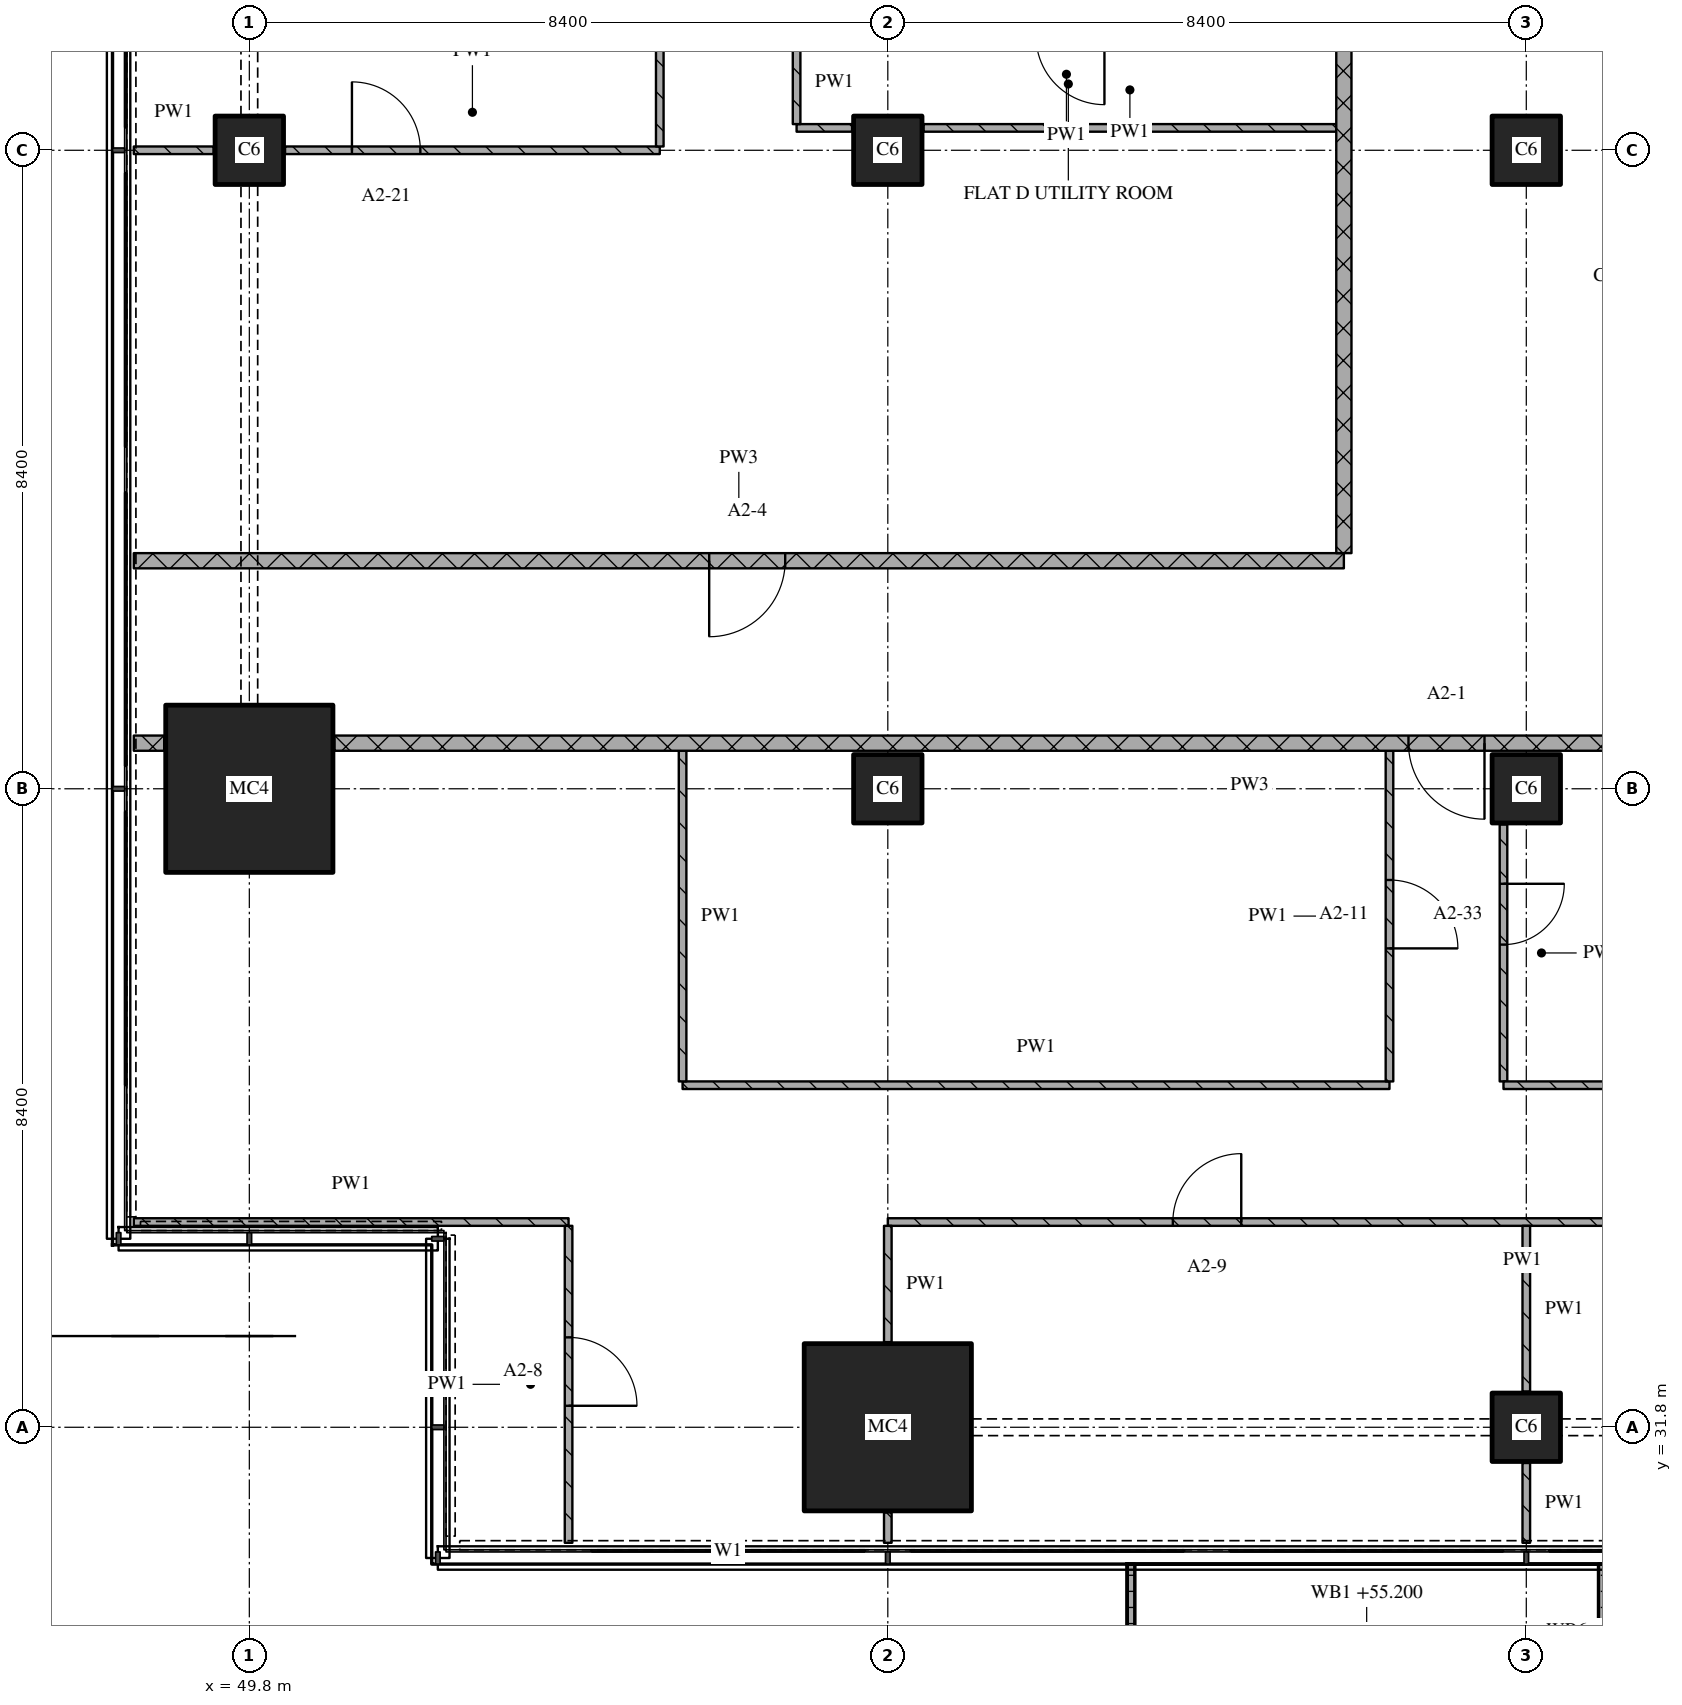
"""IFC4 building model, lengths in metres.
Left out: names, types, materials, properties, quantities, classifications, styles, units other than length and angle.
Written with IfcOpenShell. Run it as: python <this file> out.ifc"""

import sys

from ifc_helpers import new_model, si_unit, direction, frame, frame_2d, origin, origin_2d, place, context, subcontext, project, spatial, polyline, rectangle, outline, extrude, element, fill, save


model = new_model("IFC4")
c1 = context("Model", 3, precision=1e-05, world=origin(), true_north=direction((0.0, 1.0)))
c2 = subcontext(c1, "Body", "Model", "MODEL_VIEW")
j1 = project(units=[si_unit("LENGTHUNIT", "METRE"), si_unit("PLANEANGLEUNIT", "RADIAN")], contexts=[c1])
p1 = place(None, origin())
s1 = spatial("IfcSite", under=j1, at=p1, CompositionType="ELEMENT")
p2 = place(p1, origin())
s2 = spatial("IfcBuilding", under=s1, at=p2, CompositionType="ELEMENT")
p3 = place(p2, frame((0.0, 0.0, 55.2)))
s3 = spatial("IfcBuildingStorey", under=s2, at=p3, CompositionType="ELEMENT", Elevation=55.2)
p4 = place(p3, frame((49.8, 40.2, 0.0), z_axis=(0.0, 0.0, 1.0), x_axis=(1.0, 0.0, 0.0)))
e1 = element("IfcColumn", 1, at=p4, inside=s3, PredefinedType="COLUMN", context=c2, shape_type="SweptSolid", body=[
    extrude(rectangle(XDim=2.2, YDim=2.2, at=origin_2d()), origin(), (0.0, 0.0, 1.0), 3.6),
])
p5 = place(p3, frame((49.8, 48.6, 0.0), z_axis=(0.0, 0.0, 1.0), x_axis=(1.0, 0.0, 0.0)))
e2 = element("IfcColumn", 2, at=p5, inside=s3, PredefinedType="COLUMN", context=c2, shape_type="SweptSolid", body=[
    extrude(rectangle(XDim=0.9, YDim=0.9, at=origin_2d()), origin(), (0.0, 0.0, 1.0), 3.6),
])
p6 = place(p3, frame((58.2, 31.8, 0.0), z_axis=(0.0, 0.0, 1.0), x_axis=(1.0, 0.0, 0.0)))
e3 = element("IfcColumn", 3, at=p6, inside=s3, PredefinedType="COLUMN", context=c2, shape_type="SweptSolid", body=[
    extrude(rectangle(XDim=2.2, YDim=2.2, at=origin_2d()), origin(), (0.0, 0.0, 1.0), 3.6),
])
for number, where, z_axis, x_axis in (
    (4, (58.2, 40.2, 0.0), (0.0, 0.0, 1.0), (1.0, 0.0, 0.0)),
    (5, (58.2, 48.6, 0.0), (0.0, 0.0, 1.0), (1.0, 0.0, 0.0)),
    (6, (66.6, 31.8, 0.0), (0.0, 0.0, 1.0), (1.0, 0.0, 0.0)),
    (7, (66.6, 40.2, 0.0), (0.0, 0.0, 1.0), (1.0, 0.0, 0.0)),
    (8, (66.6, 48.6, 0.0), (0.0, 0.0, 1.0), (1.0, 0.0, 0.0)),
):
    element("IfcColumn", number, at=place(p3, frame(where, z_axis=z_axis, x_axis=x_axis)), inside=s3, PredefinedType="COLUMN", context=c2, shape_type="SweptSolid", body=[
        extrude(rectangle(XDim=0.9, YDim=0.9, at=origin_2d()), origin(), (0.0, 0.0, 1.0), 3.6),
    ])
p7 = place(p3, origin())
e9 = element("IfcWall", 9, at=p7, inside=s3, PredefinedType="SOLIDWALL", context=c2, shape_type="SweptSolid", body=[
    extrude(outline(polyline([(61.35, 30.0), (61.45, 30.0), (61.45, 28.233), (67.55, 28.233), (67.55, 30.0), (67.65, 30.0), (67.65, 28.133), (61.35, 28.133), (61.35, 30.0)])), origin(), (0.0, 0.0, 1.0), 1.0),
])
p8 = place(p3, frame((48.28, 34.5, 0.0), z_axis=(0.0, 0.0, 1.0), x_axis=(1.0, 0.0, 0.0)))
e10 = element("IfcWall", 10, at=p8, inside=s3, PredefinedType="PARTITIONING", context=c2, shape_type="SweptSolid", body=[
    extrude(rectangle(XDim=5.72, YDim=0.1, at=frame_2d((2.86, 0.0))), origin(), (0.0, 0.0, 1.0), 3.32),
])
p9 = place(p3, frame((74.9, 34.5, 0.0), z_axis=(0.0, 0.0, 1.0), x_axis=(-1.0, 0.0, 0.0)))
e11 = element("IfcWall", 11, at=p9, inside=s3, PredefinedType="PARTITIONING", context=c2, shape_type="SweptSolid", body=[
    extrude(rectangle(XDim=16.7, YDim=0.1, at=frame_2d((8.35, 0.0))), origin(), (0.0, 0.0, 1.0), 3.32),
])
p10 = place(p9, frame((3.65, 0.0, 0.0)))
e12 = element("IfcOpeningElement", 12, at=p10, cuts=e11, PredefinedType="OPENING", context=c2, shape_type="SweptSolid", body=[
    extrude(rectangle(XDim=0.9, YDim=2.1, at=frame_2d((0.45, 1.05))), frame((0.0, 0.06, 0.0), z_axis=(0.0, -1.0, 0.0), x_axis=(1.0, 0.0, 0.0)), (0.0, 0.0, 1.0), 0.12),
])
p11 = place(p9, frame((12.05, 0.0, 0.0)))
e13 = element("IfcOpeningElement", 13, at=p11, cuts=e11, PredefinedType="OPENING", context=c2, shape_type="SweptSolid", body=[
    extrude(rectangle(XDim=0.9, YDim=2.1, at=frame_2d((0.45, 1.05))), frame((0.0, 0.06, 0.0), z_axis=(0.0, -1.0, 0.0), x_axis=(1.0, 0.0, 0.0)), (0.0, 0.0, 1.0), 0.12),
])
p12 = place(p3, frame((55.5, 36.3, 0.0), z_axis=(0.0, 0.0, 1.0), x_axis=(1.0, 0.0, 0.0)))
e14 = element("IfcWall", 14, at=p12, inside=s3, PredefinedType="PARTITIONING", context=c2, shape_type="SweptSolid", body=[
    extrude(rectangle(XDim=9.3, YDim=0.1, at=frame_2d((4.65, 0.0))), origin(), (0.0, 0.0, 1.0), 3.32),
])
p13 = place(p3, frame((48.28, 40.8, 0.0), z_axis=(0.0, 0.0, 1.0), x_axis=(1.0, 0.0, 0.0)))
e15 = element("IfcWall", 15, at=p13, inside=s3, PredefinedType="PARTITIONING", context=c2, shape_type="SweptSolid", body=[
    extrude(rectangle(XDim=0.4, YDim=0.2, at=frame_2d((0.2, 0.0))), origin(), (0.0, 0.0, 1.0), 3.32),
])
p14 = place(p3, frame((75.0, 40.8, 0.0), z_axis=(0.0, 0.0, 1.0), x_axis=(-1.0, 0.0, 0.0)))
e16 = element("IfcWall", 16, at=p14, inside=s3, PredefinedType="PARTITIONING", context=c2, shape_type="SweptSolid", body=[
    extrude(rectangle(XDim=24.08, YDim=0.2, at=frame_2d((12.04, 0.0))), origin(), (0.0, 0.0, 1.0), 3.32),
])
p15 = place(p14, frame((8.95, 0.0, 0.0)))
e17 = element("IfcOpeningElement", 17, at=p15, cuts=e16, PredefinedType="OPENING", context=c2, shape_type="SweptSolid", body=[
    extrude(rectangle(XDim=1.0, YDim=2.1, at=frame_2d((0.5, 1.05))), frame((0.0, 0.11, 0.0), z_axis=(0.0, -1.0, 0.0), x_axis=(1.0, 0.0, 0.0)), (0.0, 0.0, 1.0), 0.22),
])
p16 = place(p3, frame((48.28, 43.2, 0.0), z_axis=(0.0, 0.0, 1.0), x_axis=(1.0, 0.0, 0.0)))
e18 = element("IfcWall", 18, at=p16, inside=s3, PredefinedType="PARTITIONING", context=c2, shape_type="SweptSolid", body=[
    extrude(rectangle(XDim=15.92, YDim=0.2, at=frame_2d((7.96, 0.0))), origin(), (0.0, 0.0, 1.0), 3.32),
])
p17 = place(p16, frame((7.57, 0.0, 0.0)))
e19 = element("IfcOpeningElement", 19, at=p17, cuts=e18, PredefinedType="OPENING", context=c2, shape_type="SweptSolid", body=[
    extrude(rectangle(XDim=1.0, YDim=2.1, at=frame_2d((0.5, 1.05))), frame((0.0, 0.11, 0.0), z_axis=(0.0, -1.0, 0.0), x_axis=(1.0, 0.0, 0.0)), (0.0, 0.0, 1.0), 0.22),
])
p18 = place(p3, frame((48.28, 48.6, 0.0), z_axis=(0.0, 0.0, 1.0), x_axis=(1.0, 0.0, 0.0)))
e20 = element("IfcWall", 20, at=p18, inside=s3, PredefinedType="PARTITIONING", context=c2, shape_type="SweptSolid", body=[
    extrude(rectangle(XDim=1.05, YDim=0.1, at=frame_2d((0.525, 0.0))), origin(), (0.0, 0.0, 1.0), 3.32),
])
p19 = place(p3, frame((50.27, 48.6, 0.0), z_axis=(0.0, 0.0, 1.0), x_axis=(1.0, 0.0, 0.0)))
e21 = element("IfcWall", 21, at=p19, inside=s3, PredefinedType="PARTITIONING", context=c2, shape_type="SweptSolid", body=[
    extrude(rectangle(XDim=4.93, YDim=0.1, at=frame_2d((2.465, 0.0))), origin(), (0.0, 0.0, 1.0), 3.32),
])
p20 = place(p19, frame((0.88, 0.0, 0.0)))
e22 = element("IfcOpeningElement", 22, at=p20, cuts=e21, PredefinedType="OPENING", context=c2, shape_type="SweptSolid", body=[
    extrude(rectangle(XDim=0.9, YDim=2.1, at=frame_2d((0.45, 1.05))), frame((0.0, 0.06, 0.0), z_axis=(0.0, -1.0, 0.0), x_axis=(1.0, 0.0, 0.0)), (0.0, 0.0, 1.0), 0.12),
])
p21 = place(p3, frame((57.0, 48.894, 0.0), z_axis=(0.0, 0.0, 1.0), x_axis=(1.0, 0.0, 0.0)))
e23 = element("IfcWall", 23, at=p21, inside=s3, PredefinedType="PARTITIONING", context=c2, shape_type="SweptSolid", body=[
    extrude(rectangle(XDim=0.73, YDim=0.1, at=frame_2d((0.365, 0.0))), origin(), (0.0, 0.0, 1.0), 3.32),
])
p22 = place(p3, frame((58.67, 48.894, 0.0), z_axis=(0.0, 0.0, 1.0), x_axis=(1.0, 0.0, 0.0)))
e24 = element("IfcWall", 24, at=p22, inside=s3, PredefinedType="PARTITIONING", context=c2, shape_type="SweptSolid", body=[
    extrude(rectangle(XDim=5.43, YDim=0.1, at=frame_2d((2.715, 0.0))), origin(), (0.0, 0.0, 1.0), 3.32),
])
p23 = place(p3, frame((54.0, 30.28, 0.0), z_axis=(0.0, 0.0, 1.0), x_axis=(0.0, 1.0, 0.0)))
e25 = element("IfcWall", 25, at=p23, inside=s3, PredefinedType="PARTITIONING", context=c2, shape_type="SweptSolid", body=[
    extrude(rectangle(XDim=4.17, YDim=0.1, at=frame_2d((2.085, 0.0))), origin(), (0.0, 0.0, 1.0), 3.32),
])
p24 = place(p23, frame((1.803, 0.0, 0.0)))
e26 = element("IfcOpeningElement", 26, at=p24, cuts=e25, PredefinedType="OPENING", context=c2, shape_type="SweptSolid", body=[
    extrude(rectangle(XDim=0.9, YDim=2.1, at=frame_2d((0.45, 1.05))), frame((0.0, 0.06, 0.0), z_axis=(0.0, -1.0, 0.0), x_axis=(1.0, 0.0, 0.0)), (0.0, 0.0, 1.0), 0.12),
])
p25 = place(p3, frame((55.5, 40.7, 0.0), z_axis=(0.0, 0.0, 1.0), x_axis=(0.0, -1.0, 0.0)))
e27 = element("IfcWall", 27, at=p25, inside=s3, PredefinedType="PARTITIONING", context=c2, shape_type="SweptSolid", body=[
    extrude(rectangle(XDim=4.35, YDim=0.1, at=frame_2d((2.175, 0.0))), origin(), (0.0, 0.0, 1.0), 3.32),
])
p26 = place(p3, frame((57.0, 50.05, 0.0), z_axis=(0.0, 0.0, 1.0), x_axis=(0.0, -1.0, 0.0)))
e28 = element("IfcWall", 28, at=p26, inside=s3, PredefinedType="PARTITIONING", context=c2, shape_type="SweptSolid", body=[
    extrude(rectangle(XDim=1.106, YDim=0.1, at=frame_2d((0.553, 0.0))), origin(), (0.0, 0.0, 1.0), 3.32),
])
p27 = place(p3, frame((58.2, 30.68, 0.0), z_axis=(0.0, 0.0, 1.0), x_axis=(0.0, -1.0, 0.0)))
e29 = element("IfcWall", 29, at=p27, inside=s3, PredefinedType="PARTITIONING", context=c2, shape_type="SweptSolid", body=[
    extrude(rectangle(XDim=0.4, YDim=0.1, at=frame_2d((0.2, 0.0))), origin(), (0.0, 0.0, 1.0), 3.32),
])
p28 = place(p3, frame((58.2, 34.45, 0.0), z_axis=(0.0, 0.0, 1.0), x_axis=(0.0, -1.0, 0.0)))
e30 = element("IfcWall", 30, at=p28, inside=s3, PredefinedType="PARTITIONING", context=c2, shape_type="SweptSolid", body=[
    extrude(rectangle(XDim=1.53, YDim=0.1, at=frame_2d((0.765, 0.0))), origin(), (0.0, 0.0, 1.0), 3.32),
])
p29 = place(p3, frame((64.2, 43.3, 0.0), z_axis=(0.0, 0.0, 1.0), x_axis=(0.0, 1.0, 0.0)))
e31 = element("IfcWall", 31, at=p29, inside=s3, PredefinedType="PARTITIONING", context=c2, shape_type="SweptSolid", body=[
    extrude(rectangle(XDim=32.02, YDim=0.2, at=frame_2d((16.01, 0.0))), origin(), (0.0, 0.0, 1.0), 3.32),
])
p30 = place(p29, frame((19.95, 0.0, 0.0)))
e32 = element("IfcOpeningElement", 32, at=p30, cuts=e31, PredefinedType="OPENING", context=c2, shape_type="SweptSolid", body=[
    extrude(rectangle(XDim=1.0, YDim=2.1, at=frame_2d((0.5, 1.05))), frame((0.0, 0.11, 0.0), z_axis=(0.0, -1.0, 0.0), x_axis=(1.0, 0.0, 0.0)), (0.0, 0.0, 1.0), 0.22),
])
p31 = place(p3, frame((64.8, 36.35, 0.0), z_axis=(0.0, 0.0, 1.0), x_axis=(0.0, 1.0, 0.0)))
e33 = element("IfcWall", 33, at=p31, inside=s3, PredefinedType="PARTITIONING", context=c2, shape_type="SweptSolid", body=[
    extrude(rectangle(XDim=4.35, YDim=0.1, at=frame_2d((2.175, 0.0))), origin(), (0.0, 0.0, 1.0), 3.32),
])
p32 = place(p31, frame((1.75, 0.0, 0.0)))
e34 = element("IfcOpeningElement", 34, at=p32, cuts=e33, PredefinedType="OPENING", context=c2, shape_type="SweptSolid", body=[
    extrude(rectangle(XDim=0.9, YDim=2.1, at=frame_2d((0.45, 1.05))), frame((0.0, 0.06, 0.0), z_axis=(0.0, -1.0, 0.0), x_axis=(1.0, 0.0, 0.0)), (0.0, 0.0, 1.0), 0.12),
])
p33 = place(p3, frame((66.3, 39.73, 0.0), z_axis=(0.0, 0.0, 1.0), x_axis=(0.0, -1.0, 0.0)))
e35 = element("IfcWall", 35, at=p33, inside=s3, PredefinedType="PARTITIONING", context=c2, shape_type="SweptSolid", body=[
    extrude(rectangle(XDim=3.38, YDim=0.1, at=frame_2d((1.69, 0.0))), origin(), (0.0, 0.0, 1.0), 3.32),
])
p34 = place(p33, frame((0.78, 0.0, 0.0)))
e36 = element("IfcOpeningElement", 36, at=p34, cuts=e35, PredefinedType="OPENING", context=c2, shape_type="SweptSolid", body=[
    extrude(rectangle(XDim=0.8, YDim=2.1, at=frame_2d((0.4, 1.05))), frame((0.0, 0.06, 0.0), z_axis=(0.0, -1.0, 0.0), x_axis=(1.0, 0.0, 0.0)), (0.0, 0.0, 1.0), 0.12),
])
p35 = place(p3, frame((66.6, 31.33, 0.0), z_axis=(0.0, 0.0, 1.0), x_axis=(0.0, -1.0, 0.0)))
e37 = element("IfcWall", 37, at=p35, inside=s3, PredefinedType="PARTITIONING", context=c2, shape_type="SweptSolid", body=[
    extrude(rectangle(XDim=1.05, YDim=0.1, at=frame_2d((0.525, 0.0))), origin(), (0.0, 0.0, 1.0), 3.32),
])
p36 = place(p3, frame((66.6, 34.45, 0.0), z_axis=(0.0, 0.0, 1.0), x_axis=(0.0, -1.0, 0.0)))
e38 = element("IfcWall", 38, at=p36, inside=s3, PredefinedType="PARTITIONING", context=c2, shape_type="SweptSolid", body=[
    extrude(rectangle(XDim=2.18, YDim=0.1, at=frame_2d((1.09, 0.0))), origin(), (0.0, 0.0, 1.0), 3.32),
])
p37 = place(p3, frame((66.3, 36.3, 0.0), z_axis=(0.0, 0.0, 1.0), x_axis=(1.0, 0.0, 0.0)))
e39 = element("IfcWall", 39, at=p37, inside=s3, PredefinedType="PARTITIONING", context=c2, shape_type="SweptSolid", body=[
    extrude(rectangle(XDim=8.6, YDim=0.1, at=frame_2d((4.3, 0.0))), origin(), (0.0, 0.0, 1.0), 3.32),
])
p38 = place(p37, frame((6.2, 0.0, 0.0)))
e40 = element("IfcOpeningElement", 40, at=p38, cuts=e39, PredefinedType="OPENING", context=c2, shape_type="SweptSolid", body=[
    extrude(rectangle(XDim=0.8, YDim=2.1, at=frame_2d((0.4, 1.05))), frame((0.0, 0.06, 0.0), z_axis=(0.0, -1.0, 0.0), x_axis=(1.0, 0.0, 0.0)), (0.0, 0.0, 1.0), 0.12),
])
p39 = place(p3, frame((55.2, 56.9, 0.0), z_axis=(0.0, 0.0, 1.0), x_axis=(0.0, -1.0, 0.0)))
e41 = element("IfcWall", 41, at=p39, inside=s3, PredefinedType="PARTITIONING", context=c2, shape_type="SweptSolid", body=[
    extrude(rectangle(XDim=8.25, YDim=0.1, at=frame_2d((4.125, 0.0))), origin(), (0.0, 0.0, 1.0), 3.32),
])
p40 = place(p11, origin())
e42 = element("IfcDoor", 42, at=p40, inside=s3, OperationType="SINGLE_SWING_RIGHT", PredefinedType="DOOR", context=c2, shape_type="SweptSolid", body=[
    extrude(rectangle(XDim=0.9, YDim=2.1, at=frame_2d((0.45, 1.05))), frame((0.0, 0.025, 0.0), z_axis=(0.0, -1.0, 0.0), x_axis=(1.0, 0.0, 0.0)), (0.0, 0.0, 1.0), 0.05),
])
fill(e13, e42)
p41 = place(p15, origin())
e43 = element("IfcDoor", 43, at=p41, inside=s3, OperationType="SINGLE_SWING_LEFT", PredefinedType="DOOR", context=c2, shape_type="SweptSolid", body=[
    extrude(rectangle(XDim=1.0, YDim=2.1, at=frame_2d((0.5, 1.05))), frame((0.0, 0.025, 0.0), z_axis=(0.0, -1.0, 0.0), x_axis=(1.0, 0.0, 0.0)), (0.0, 0.0, 1.0), 0.05),
])
fill(e17, e43)
p42 = place(p17, origin())
e44 = element("IfcDoor", 44, at=p42, inside=s3, OperationType="SINGLE_SWING_RIGHT", PredefinedType="DOOR", context=c2, shape_type="SweptSolid", body=[
    extrude(rectangle(XDim=1.0, YDim=2.1, at=frame_2d((0.5, 1.05))), frame((0.0, 0.025, 0.0), z_axis=(0.0, -1.0, 0.0), x_axis=(1.0, 0.0, 0.0)), (0.0, 0.0, 1.0), 0.05),
])
fill(e19, e44)
p43 = place(p20, origin())
e45 = element("IfcDoor", 45, at=p43, inside=s3, OperationType="SINGLE_SWING_LEFT", PredefinedType="DOOR", context=c2, shape_type="SweptSolid", body=[
    extrude(rectangle(XDim=0.9, YDim=2.1, at=frame_2d((0.45, 1.05))), frame((0.0, 0.025, 0.0), z_axis=(0.0, -1.0, 0.0), x_axis=(1.0, 0.0, 0.0)), (0.0, 0.0, 1.0), 0.05),
])
fill(e22, e45)
p44 = place(p24, origin())
e46 = element("IfcDoor", 46, at=p44, inside=s3, OperationType="SINGLE_SWING_RIGHT", PredefinedType="DOOR", context=c2, shape_type="SweptSolid", body=[
    extrude(rectangle(XDim=0.9, YDim=2.1, at=frame_2d((0.45, 1.05))), frame((0.0, 0.025, 0.0), z_axis=(0.0, -1.0, 0.0), x_axis=(1.0, 0.0, 0.0)), (0.0, 0.0, 1.0), 0.05),
])
fill(e26, e46)
p45 = place(p32, origin())
e47 = element("IfcDoor", 47, at=p45, inside=s3, OperationType="SINGLE_SWING_RIGHT", PredefinedType="DOOR", context=c2, shape_type="SweptSolid", body=[
    extrude(rectangle(XDim=0.9, YDim=2.1, at=frame_2d((0.45, 1.05))), frame((0.0, 0.025, 0.0), z_axis=(0.0, -1.0, 0.0), x_axis=(1.0, 0.0, 0.0)), (0.0, 0.0, 1.0), 0.05),
])
fill(e34, e47)
p46 = place(p34, origin())
e48 = element("IfcDoor", 48, at=p46, inside=s3, OperationType="SINGLE_SWING_LEFT", PredefinedType="DOOR", context=c2, shape_type="SweptSolid", body=[
    extrude(rectangle(XDim=0.8, YDim=2.1, at=frame_2d((0.4, 1.05))), frame((0.0, 0.025, 0.0), z_axis=(0.0, -1.0, 0.0), x_axis=(1.0, 0.0, 0.0)), (0.0, 0.0, 1.0), 0.05),
])
fill(e36, e48)
save(model, sys.argv[1])
